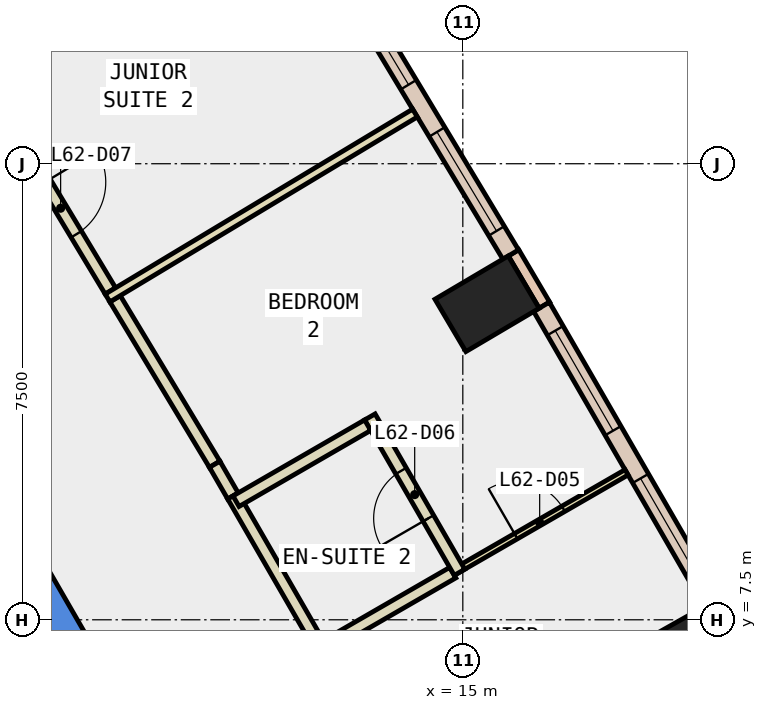
"""IFC4 building model, lengths in metres.
Left out: names, types, materials, properties, quantities, classifications, styles, units other than length and angle.
Written with IfcOpenShell. Run it as: python <this file> out.ifc"""

import sys

from ifc_helpers import new_model, si_unit, direction, frame, frame_2d, origin, origin_2d, place, context, subcontext, project, spatial, polyline, rectangle, outline, extrude, element, fill, save


model = new_model("IFC4")
c1 = context("Model", 3, precision=1e-05, world=origin(), true_north=direction((0.0, 1.0)))
c2 = subcontext(c1, "Body", "Model", "MODEL_VIEW")
j1 = project(units=[si_unit("LENGTHUNIT", "METRE"), si_unit("PLANEANGLEUNIT", "RADIAN")], contexts=[c1])
p1 = place(None, origin())
s1 = spatial("IfcSite", under=j1, at=p1, CompositionType="ELEMENT")
p2 = place(p1, origin())
s2 = spatial("IfcBuilding", under=s1, at=p2, CompositionType="ELEMENT")
p3 = place(p2, frame((0.0, 0.0, 270.2)))
s3 = spatial("IfcBuildingStorey", under=s2, at=p3, CompositionType="ELEMENT", Elevation=270.2)
for number, where, z_axis, x_axis in (
    (1, (18.696, 6.987, -0.34), (0.0, 0.0, 1.0), (-0.491, 0.871, 0.0)),
    (2, (15.399, 12.697, -0.34), (0.0, 0.0, 1.0), (-0.509, 0.861, 0.0)),
):
    element("IfcColumn", number, at=place(p3, frame(where, z_axis=z_axis, x_axis=x_axis)), inside=s3, PredefinedType="COLUMN", context=c2, shape_type="SweptSolid", body=[
        extrude(rectangle(XDim=1.0, YDim=1.4, at=origin_2d()), origin(), (0.0, 0.0, 1.0), 3.6),
    ])
p4 = place(p3, frame((0.0, 0.0, -0.34)))
e3 = element("IfcWall", 3, at=p4, inside=s3, PredefinedType="SHEAR", context=c2, shape_type="SweptSolid", body=[
    extrude(outline(polyline([(6.786, 10.747), (6.266, 10.447), (10.854, 2.5), (11.547, 2.5), (6.786, 10.747)])), origin(), (0.0, 0.0, 1.0), 3.6),
])
p5 = place(p3, frame((16.342, 12.674, 0.0), z_axis=(0.0, 0.0, 1.0), x_axis=(-0.508268432768, 0.861198699634, 0.0)))
e4 = element("IfcWall", 4, at=p5, inside=s3, PredefinedType="STANDARD", context=c2, shape_type="SweptSolid", body=[
    extrude(rectangle(XDim=1.0, YDim=0.2, at=frame_2d((0.5, 0.0))), origin(), (0.0, 0.0, 1.0), 3.26),
])
p6 = place(p3, frame((19.1, 7.787, 0.0), z_axis=(0.0, 0.0, 1.0), x_axis=(-0.500041292042, 0.866001562501, 0.0)))
e5 = element("IfcWall", 5, at=p6, inside=s3, PredefinedType="STANDARD", context=c2, shape_type="SweptSolid", body=[
    extrude(rectangle(XDim=5.612, YDim=0.3, at=frame_2d((2.806, 0.0))), origin(), (0.0, 0.0, 1.0), 3.26),
])
p7 = place(p6, frame((0.453, 0.0, 0.9)))
e6 = element("IfcOpeningElement", 6, at=p7, cuts=e5, PredefinedType="OPENING", context=c2, shape_type="SweptSolid", body=[
    extrude(rectangle(XDim=1.9, YDim=2.0, at=frame_2d((0.95, 1.0))), frame((0.0, 0.16, 0.0), z_axis=(0.0, -1.0, 0.0), x_axis=(1.0, 0.0, 0.0)), (0.0, 0.0, 1.0), 0.32),
])
p8 = place(p6, frame((3.259, 0.0, 0.9)))
e7 = element("IfcOpeningElement", 7, at=p8, cuts=e5, PredefinedType="OPENING", context=c2, shape_type="SweptSolid", body=[
    extrude(rectangle(XDim=1.9, YDim=2.0, at=frame_2d((0.95, 1.0))), frame((0.0, 0.16, 0.0), z_axis=(0.0, -1.0, 0.0), x_axis=(1.0, 0.0, 0.0)), (0.0, 0.0, 1.0), 0.32),
])
p9 = place(p3, frame((15.788, 13.506, 0.0), z_axis=(0.0, 0.0, 1.0), x_axis=(-0.515435742129, 0.856928232547, 0.0)))
e8 = element("IfcWall", 8, at=p9, inside=s3, PredefinedType="STANDARD", context=c2, shape_type="SweptSolid", body=[
    extrude(rectangle(XDim=5.613, YDim=0.3, at=frame_2d((2.806, 0.0))), origin(), (0.0, 0.0, 1.0), 3.26),
])
p10 = place(p9, frame((0.453, 0.0, 0.9)))
e9 = element("IfcOpeningElement", 9, at=p10, cuts=e8, PredefinedType="OPENING", context=c2, shape_type="SweptSolid", body=[
    extrude(rectangle(XDim=1.9, YDim=2.0, at=frame_2d((0.95, 1.0))), frame((0.0, 0.16, 0.0), z_axis=(0.0, -1.0, 0.0), x_axis=(1.0, 0.0, 0.0)), (0.0, 0.0, 1.0), 0.32),
])
p11 = place(p9, frame((3.26, 0.0, 0.9)))
e10 = element("IfcOpeningElement", 10, at=p11, cuts=e8, PredefinedType="OPENING", context=c2, shape_type="SweptSolid", body=[
    extrude(rectangle(XDim=1.9, YDim=2.0, at=frame_2d((0.95, 1.0))), frame((0.0, 0.16, 0.0), z_axis=(0.0, -1.0, 0.0), x_axis=(1.0, 0.0, 0.0)), (0.0, 0.0, 1.0), 0.32),
])
p12 = place(p3, frame((9.281, 12.779, 0.0), z_axis=(0.0, 0.0, 1.0), x_axis=(0.515568955032, -0.856848091908, 0.0)))
e11 = element("IfcWall", 11, at=p12, inside=s3, PredefinedType="PARTITIONING", context=c2, shape_type="SweptSolid", body=[
    extrude(rectangle(XDim=3.177, YDim=0.2, at=frame_2d((1.588, 0.0))), origin(), (0.0, 0.0, 1.0), 3.26),
])
p13 = place(p3, frame((10.919, 10.057, 0.0), z_axis=(0.0, 0.0, 1.0), x_axis=(0.500284357783, -0.865861167485, 0.0)))
e12 = element("IfcWall", 12, at=p13, inside=s3, PredefinedType="PARTITIONING", context=c2, shape_type="SweptSolid", body=[
    extrude(rectangle(XDim=0.602, YDim=0.2, at=frame_2d((0.301, 0.0))), origin(), (0.0, 0.0, 1.0), 3.26),
])
p14 = place(p3, frame((11.22, 9.536, 0.0), z_axis=(0.0, 0.0, 1.0), x_axis=(0.500049511043, -0.865996816683, 0.0)))
e13 = element("IfcWall", 13, at=p14, inside=s3, PredefinedType="PARTITIONING", context=c2, shape_type="SweptSolid", body=[
    extrude(rectangle(XDim=2.8, YDim=0.2, at=frame_2d((1.4, 0.0))), origin(), (0.0, 0.0, 1.0), 3.26),
])
p15 = place(p3, frame((7.567, 15.629, 0.0), z_axis=(0.0, 0.0, 1.0), x_axis=(0.51556943596, -0.856847802532, 0.0)))
e14 = element("IfcWall", 14, at=p15, inside=s3, PredefinedType="PARTITIONING", context=c2, shape_type="SweptSolid", body=[
    extrude(rectangle(XDim=3.176, YDim=0.2, at=frame_2d((1.588, 0.0))), origin(), (0.0, 0.0, 1.0), 3.26),
])
p16 = place(p15, frame((1.088, 0.0, 0.0)))
e15 = element("IfcOpeningElement", 15, at=p16, cuts=e14, PredefinedType="OPENING", context=c2, shape_type="SweptSolid", body=[
    extrude(rectangle(XDim=1.0, YDim=2.1, at=frame_2d((0.5, 1.05))), frame((0.0, 0.11, 0.0), z_axis=(0.0, -1.0, 0.0), x_axis=(1.0, 0.0, 0.0)), (0.0, 0.0, 1.0), 0.22),
])
p17 = place(p3, frame((14.835, 8.275, 0.0), z_axis=(0.0, 0.0, 1.0), x_axis=(0.8660266723, 0.49999780286, 0.0)))
e16 = element("IfcWall", 16, at=p17, inside=s3, PredefinedType="PARTITIONING", context=c2, shape_type="SweptSolid", body=[
    extrude(rectangle(XDim=3.3, YDim=0.1, at=frame_2d((1.65, 0.0))), origin(), (0.0, 0.0, 1.0), 3.26),
])
p18 = place(p17, frame((1.2, 0.0, 0.0)))
e17 = element("IfcOpeningElement", 17, at=p18, cuts=e16, PredefinedType="OPENING", context=c2, shape_type="SweptSolid", body=[
    extrude(rectangle(XDim=0.9, YDim=2.1, at=frame_2d((0.45, 1.05))), frame((0.0, 0.06, 0.0), z_axis=(0.0, -1.0, 0.0), x_axis=(1.0, 0.0, 0.0)), (0.0, 0.0, 1.0), 0.12),
])
p19 = place(p3, frame((12.756, 7.075, 0.0), z_axis=(0.0, 0.0, 1.0), x_axis=(0.866075499611, 0.499913221443, 0.0)))
e18 = element("IfcWall", 18, at=p19, inside=s3, PredefinedType="PARTITIONING", context=c2, shape_type="SweptSolid", body=[
    extrude(rectangle(XDim=2.4, YDim=0.2, at=frame_2d((1.2, 0.0))), origin(), (0.0, 0.0, 1.0), 3.26),
])
p20 = place(p3, frame((14.946, 8.281, 0.0), z_axis=(0.0, 0.0, 1.0), x_axis=(-0.500001826776, 0.866024349092, 0.0)))
e19 = element("IfcWall", 19, at=p20, inside=s3, PredefinedType="PARTITIONING", context=c2, shape_type="SweptSolid", body=[
    extrude(rectangle(XDim=2.95, YDim=0.2, at=frame_2d((1.475, 0.0))), origin(), (0.0, 0.0, 1.0), 3.26),
])
p21 = place(p20, frame((1.025, 0.0, 0.0)))
e20 = element("IfcOpeningElement", 20, at=p21, cuts=e19, PredefinedType="OPENING", context=c2, shape_type="SweptSolid", body=[
    extrude(rectangle(XDim=0.9, YDim=2.1, at=frame_2d((0.45, 1.05))), frame((0.0, 0.11, 0.0), z_axis=(0.0, -1.0, 0.0), x_axis=(1.0, 0.0, 0.0)), (0.0, 0.0, 1.0), 0.22),
])
p22 = place(p3, frame((13.435, 10.7, 0.0), z_axis=(0.0, 0.0, 1.0), x_axis=(-0.866022959057, -0.500004234368, 0.0)))
e21 = element("IfcWall", 21, at=p22, inside=s3, PredefinedType="PARTITIONING", context=c2, shape_type="SweptSolid", body=[
    extrude(rectangle(XDim=2.5, YDim=0.2, at=frame_2d((1.25, 0.0))), origin(), (0.0, 0.0, 1.0), 3.26),
])
p23 = place(p3, frame((9.157, 12.792, 0.0), z_axis=(0.0, 0.0, 1.0), x_axis=(0.856933793276, 0.515426497129, 0.0)))
e22 = element("IfcWall", 22, at=p23, inside=s3, PredefinedType="PARTITIONING", context=c2, shape_type="SweptSolid", body=[
    extrude(rectangle(XDim=5.9, YDim=0.15, at=frame_2d((2.95, 0.0))), origin(), (0.0, 0.0, 1.0), 3.26),
])
p24 = place(p3, frame((8.48, 3.412, 0.0), z_axis=(0.0, 0.0, 1.0), x_axis=(-0.499978703459, 0.866037698999, 0.0)))
e23 = element("IfcWall", 23, at=p24, inside=s3, PredefinedType="STANDARD", context=c2, shape_type="SweptSolid", body=[
    extrude(rectangle(XDim=6.9, YDim=0.2, at=frame_2d((3.45, 0.0))), origin(), (0.0, 0.0, 1.0), 3.26),
])
p25 = place(p7, origin())
e24 = element("IfcWindow", 24, at=p25, inside=s3, PartitioningType="SINGLE_PANEL", PredefinedType="WINDOW", context=c2, shape_type="SweptSolid", body=[
    extrude(rectangle(XDim=1.9, YDim=2.0, at=frame_2d((0.95, 1.0))), frame((0.0, 0.03, 0.0), z_axis=(0.0, -1.0, 0.0), x_axis=(1.0, 0.0, 0.0)), (0.0, 0.0, 1.0), 0.06),
])
fill(e6, e24)
p26 = place(p8, origin())
e25 = element("IfcWindow", 25, at=p26, inside=s3, PartitioningType="SINGLE_PANEL", PredefinedType="WINDOW", context=c2, shape_type="SweptSolid", body=[
    extrude(rectangle(XDim=1.9, YDim=2.0, at=frame_2d((0.95, 1.0))), frame((0.0, 0.03, 0.0), z_axis=(0.0, -1.0, 0.0), x_axis=(1.0, 0.0, 0.0)), (0.0, 0.0, 1.0), 0.06),
])
fill(e7, e25)
p27 = place(p10, origin())
e26 = element("IfcWindow", 26, at=p27, inside=s3, PartitioningType="SINGLE_PANEL", PredefinedType="WINDOW", context=c2, shape_type="SweptSolid", body=[
    extrude(rectangle(XDim=1.9, YDim=2.0, at=frame_2d((0.95, 1.0))), frame((0.0, 0.03, 0.0), z_axis=(0.0, -1.0, 0.0), x_axis=(1.0, 0.0, 0.0)), (0.0, 0.0, 1.0), 0.06),
])
fill(e9, e26)
p28 = place(p11, origin())
e27 = element("IfcWindow", 27, at=p28, inside=s3, PartitioningType="SINGLE_PANEL", PredefinedType="WINDOW", context=c2, shape_type="SweptSolid", body=[
    extrude(rectangle(XDim=1.9, YDim=2.0, at=frame_2d((0.95, 1.0))), frame((0.0, 0.03, 0.0), z_axis=(0.0, -1.0, 0.0), x_axis=(1.0, 0.0, 0.0)), (0.0, 0.0, 1.0), 0.06),
])
fill(e10, e27)
p29 = place(p18, origin())
e28 = element("IfcDoor", 28, at=p29, inside=s3, OperationType="SINGLE_SWING_RIGHT", PredefinedType="DOOR", context=c2, shape_type="SweptSolid", body=[
    extrude(rectangle(XDim=0.9, YDim=2.1, at=frame_2d((0.45, 1.05))), frame((0.0, 0.025, 0.0), z_axis=(0.0, -1.0, 0.0), x_axis=(1.0, 0.0, 0.0)), (0.0, 0.0, 1.0), 0.05),
])
fill(e17, e28)
p30 = place(p21, origin())
e29 = element("IfcDoor", 29, at=p30, inside=s3, OperationType="SINGLE_SWING_LEFT", PredefinedType="DOOR", context=c2, shape_type="SweptSolid", body=[
    extrude(rectangle(XDim=0.9, YDim=2.1, at=frame_2d((0.45, 1.05))), frame((0.0, 0.025, 0.0), z_axis=(0.0, -1.0, 0.0), x_axis=(1.0, 0.0, 0.0)), (0.0, 0.0, 1.0), 0.05),
])
fill(e20, e29)
p31 = place(p16, origin())
e30 = element("IfcDoor", 30, at=p31, inside=s3, OperationType="SINGLE_SWING_RIGHT", PredefinedType="DOOR", context=c2, shape_type="SweptSolid", body=[
    extrude(rectangle(XDim=1.0, YDim=2.1, at=frame_2d((0.5, 1.05))), frame((0.0, 0.025, 0.0), z_axis=(0.0, -1.0, 0.0), x_axis=(1.0, 0.0, 0.0)), (0.0, 0.0, 1.0), 0.05),
])
fill(e15, e30)
save(model, sys.argv[1])
